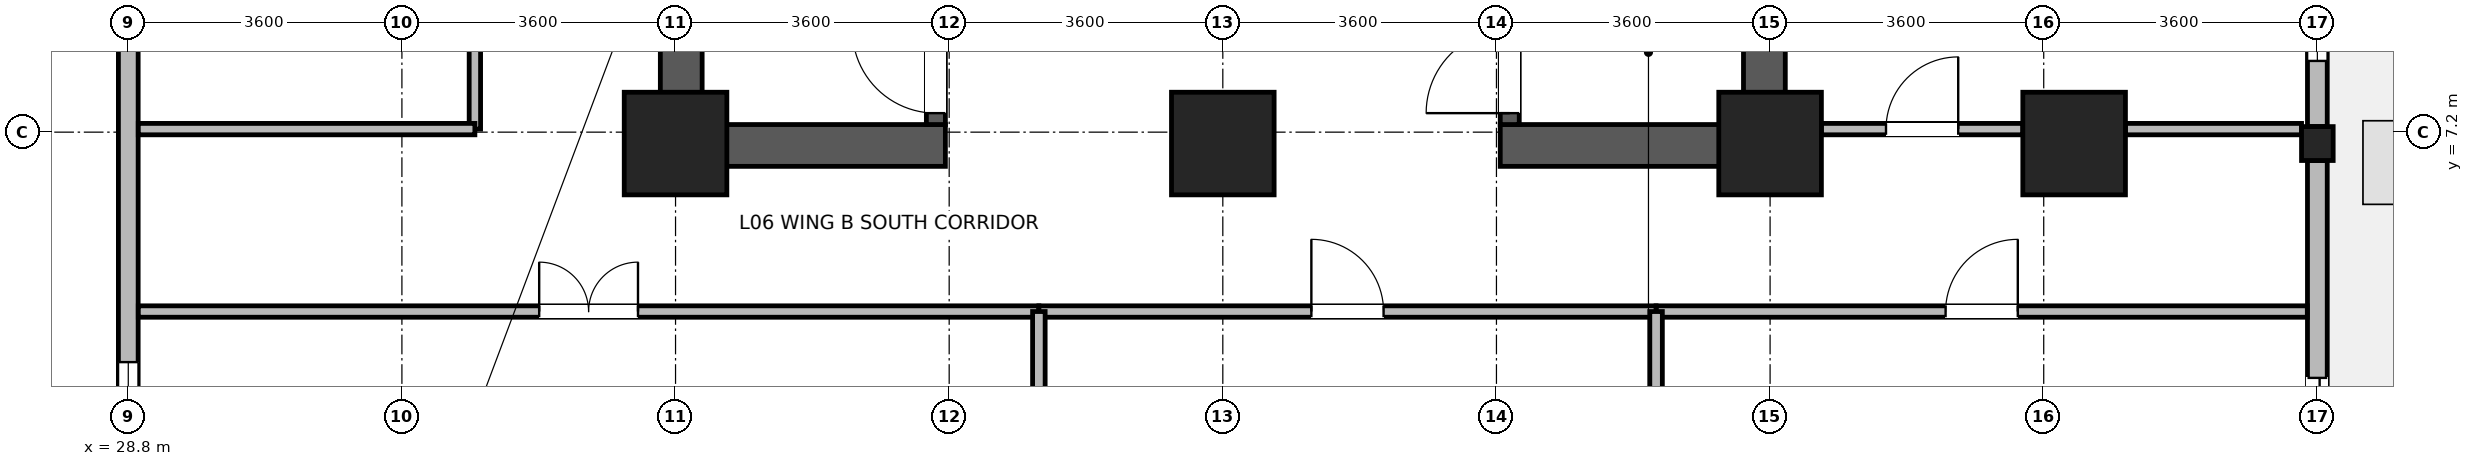
"""IFC4 building model, lengths in metres.
Left out: names, types, materials, properties, quantities, classifications, styles, units other than length and angle.
Written with IfcOpenShell. Run it as: python <this file> out.ifc"""

import sys

from ifc_helpers import new_model, si_unit, direction, frame, frame_2d, origin, origin_2d, place, context, subcontext, project, spatial, rectangle, i_section, extrude, source, transform, mapped, element, fill, save


model = new_model("IFC4")
c1 = context("Model", 3, precision=1e-05, world=origin(), true_north=direction((0.0, 1.0)))
c2 = subcontext(c1, "Body", "Model", "MODEL_VIEW")
j1 = project(units=[si_unit("LENGTHUNIT", "METRE"), si_unit("PLANEANGLEUNIT", "RADIAN")], contexts=[c1])
p1 = place(None, origin())
s1 = spatial("IfcSite", under=j1, at=p1, CompositionType="ELEMENT")
p2 = place(p1, origin())
s2 = spatial("IfcBuilding", under=s1, at=p2, CompositionType="ELEMENT")
p3 = place(p2, frame((0.0, 0.0, 29.0)))
s3 = spatial("IfcBuildingStorey", under=s2, at=p3, CompositionType="ELEMENT", Elevation=29.0)
for number, where, z_axis, x_axis in (
    (1, (36.075, 6.75, 0.0), (0.0, 0.0, 1.0), (0.0, 1.0, 0.0)),
    (2, (50.325, 6.75, 0.0), (0.0, 0.0, 1.0), (0.0, 1.0, 0.0)),
):
    element("IfcWall", number, at=place(p3, frame(where, z_axis=z_axis, x_axis=x_axis)), inside=s3, PredefinedType="SHEAR", context=c2, shape_type="SweptSolid", body=[
        extrude(rectangle(XDim=8.1, YDim=0.55, at=frame_2d((4.05, 0.0))), origin(), (0.0, 0.0, 1.0), 3.45),
    ])
for number, where, z_axis, x_axis in (
    (3, (36.35, 7.025, 0.0), (0.0, 0.0, 1.0), (1.0, 0.0, 0.0)),
    (4, (46.85, 7.025, 0.0), (0.0, 0.0, 1.0), (1.0, 0.0, 0.0)),
):
    element("IfcWall", number, at=place(p3, frame(where, z_axis=z_axis, x_axis=x_axis)), inside=s3, PredefinedType="SHEAR", context=c2, shape_type="SweptSolid", body=[
        extrude(rectangle(XDim=3.2, YDim=0.55, at=frame_2d((1.6, 0.0))), origin(), (0.0, 0.0, 1.0), 3.45),
    ])
p4 = place(p3, frame((39.425, 7.3, 0.0), z_axis=(0.0, 0.0, 1.0), x_axis=(0.0, 1.0, 0.0)))
e5 = element("IfcWall", 5, at=p4, inside=s3, PredefinedType="SHEAR", context=c2, shape_type="SweptSolid", body=[
    extrude(rectangle(XDim=7.0, YDim=0.25, at=frame_2d((3.5, 0.0))), origin(), (0.0, 0.0, 1.0), 3.45),
])
p5 = place(p4, frame((0.15, 0.0, 0.0)))
e6 = element("IfcOpeningElement", 6, at=p5, cuts=e5, PredefinedType="OPENING", context=c2, shape_type="SweptSolid", body=[
    extrude(rectangle(XDim=1.1, YDim=2.08, at=frame_2d((0.55, 1.04))), frame((0.0, 0.135, 0.0), z_axis=(0.0, -1.0, 0.0), x_axis=(1.0, 0.0, 0.0)), (0.0, 0.0, 1.0), 0.27),
])
p6 = place(p3, frame((46.975, 7.3, 0.0), z_axis=(0.0, 0.0, 1.0), x_axis=(0.0, 1.0, 0.0)))
e7 = element("IfcWall", 7, at=p6, inside=s3, PredefinedType="SHEAR", context=c2, shape_type="SweptSolid", body=[
    extrude(rectangle(XDim=7.0, YDim=0.25, at=frame_2d((3.5, 0.0))), origin(), (0.0, 0.0, 1.0), 3.45),
])
p7 = place(p6, frame((0.15, 0.0, 0.0)))
e8 = element("IfcOpeningElement", 8, at=p7, cuts=e7, PredefinedType="OPENING", context=c2, shape_type="SweptSolid", body=[
    extrude(rectangle(XDim=1.1, YDim=2.08, at=frame_2d((0.55, 1.04))), frame((0.0, 0.135, 0.0), z_axis=(0.0, -1.0, 0.0), x_axis=(1.0, 0.0, 0.0)), (0.0, 0.0, 1.0), 0.27),
])
m1 = source(origin(), c2, "Body", "SweptSolid", [
    extrude(rectangle(XDim=1.35, YDim=1.35, at=origin_2d()), origin(), (0.0, 0.0, 1.0), 3.7),
])
for number, where, z_axis, x_axis in (
    (9, (36.0, 7.05, 0.0), (0.0, 0.0, 1.0), (1.0, 0.0, 0.0)),
    (10, (43.2, 7.05, 0.0), (0.0, 0.0, 1.0), (1.0, 0.0, 0.0)),
    (11, (50.4, 7.05, 0.0), (0.0, 0.0, 1.0), (1.0, 0.0, 0.0)),
    (12, (54.4, 7.05, 0.0), (0.0, 0.0, 1.0), (1.0, 0.0, 0.0)),
):
    element("IfcColumn", number, at=place(p3, frame(where, z_axis=z_axis, x_axis=x_axis)), inside=s3, PredefinedType="COLUMN", context=c2, shape_type="MappedRepresentation", body=[
        mapped(m1, transform((0.0, 0.0, 0.0), x_axis=(1.0, 0.0, 0.0), y_axis=(0.0, 1.0, 0.0), z_axis=(0.0, 0.0, 1.0), scale=1.0)),
    ])
m2 = source(origin(), c2, "Body", "SweptSolid", [
    extrude(i_section(OverallWidth=0.416, OverallDepth=0.446, WebThickness=0.029, FlangeThickness=0.04, FilletRadius=0.015, at=origin_2d()), origin(), (0.0, 0.0, 1.0), 3.7),
])
p8 = place(p3, frame((57.6, 7.05, 0.0), z_axis=(0.0, 0.0, 1.0), x_axis=(1.0, 0.0, 0.0)))
e13 = element("IfcColumn", 13, at=p8, inside=s3, PredefinedType="COLUMN", context=c2, shape_type="MappedRepresentation", body=[
    mapped(m2, transform((0.0, 0.0, 0.0), x_axis=(1.0, 0.0, 0.0), y_axis=(0.0, 1.0, 0.0), z_axis=(0.0, 0.0, 1.0), scale=1.0)),
])
p9 = place(p3, frame((57.6, 6.826, 0.0), z_axis=(0.0, 0.0, 1.0), x_axis=(0.0, -1.0, 0.0)))
e14 = element("IfcWall", 14, at=p9, inside=s3, PredefinedType="STANDARD", context=c2, shape_type="SweptSolid", body=[
    extrude(rectangle(XDim=5.156, YDim=0.26, at=frame_2d((2.578, 0.0))), origin(), (0.0, 0.0, 1.0), 3.43),
])
p10 = place(p9, frame((2.859, 0.0, 0.0)))
e15 = element("IfcOpeningElement", 15, at=p10, cuts=e14, PredefinedType="OPENING", context=c2, shape_type="SweptSolid", body=[
    extrude(rectangle(XDim=1.5, YDim=2.15, at=frame_2d((0.75, 1.075))), frame((0.0, 0.14, 0.0), z_axis=(0.0, -1.0, 0.0), x_axis=(1.0, 0.0, 0.0)), (0.0, 0.0, 1.0), 0.28),
])
p11 = place(p3, frame((57.6, 14.326, 0.0), z_axis=(0.0, 0.0, 1.0), x_axis=(0.0, -1.0, 0.0)))
e16 = element("IfcWall", 16, at=p11, inside=s3, PredefinedType="STANDARD", context=c2, shape_type="SweptSolid", body=[
    extrude(rectangle(XDim=7.052, YDim=0.26, at=frame_2d((3.526, 0.0))), origin(), (0.0, 0.0, 1.0), 2.93),
])
p12 = place(p11, frame((0.863, 0.0, 0.85)))
e17 = element("IfcOpeningElement", 17, at=p12, cuts=e16, PredefinedType="OPENING", context=c2, shape_type="SweptSolid", body=[
    extrude(rectangle(XDim=1.8, YDim=1.85, at=frame_2d((0.9, 0.925))), frame((0.0, 0.14, 0.0), z_axis=(0.0, -1.0, 0.0), x_axis=(1.0, 0.0, 0.0)), (0.0, 0.0, 1.0), 0.28),
])
p13 = place(p11, frame((4.389, 0.0, 0.85)))
e18 = element("IfcOpeningElement", 18, at=p13, cuts=e16, PredefinedType="OPENING", context=c2, shape_type="SweptSolid", body=[
    extrude(rectangle(XDim=1.8, YDim=1.85, at=frame_2d((0.9, 0.925))), frame((0.0, 0.14, 0.0), z_axis=(0.0, -1.0, 0.0), x_axis=(1.0, 0.0, 0.0)), (0.0, 0.0, 1.0), 0.28),
])
p14 = place(p3, frame((28.8, 1.67, 0.0), z_axis=(0.0, 0.0, 1.0), x_axis=(0.0, 1.0, 0.0)))
e19 = element("IfcWall", 19, at=p14, inside=s3, PredefinedType="STANDARD", context=c2, shape_type="SweptSolid", body=[
    extrude(rectangle(XDim=19.254, YDim=0.26, at=frame_2d((9.627, 0.0))), origin(), (0.0, 0.0, 1.0), 3.43),
])
p15 = place(p14, frame((0.705, 0.0, 0.85)))
e20 = element("IfcOpeningElement", 20, at=p15, cuts=e19, PredefinedType="OPENING", context=c2, shape_type="SweptSolid", body=[
    extrude(rectangle(XDim=1.8, YDim=1.85, at=frame_2d((0.9, 0.925))), frame((0.0, 0.14, 0.0), z_axis=(0.0, -1.0, 0.0), x_axis=(1.0, 0.0, 0.0)), (0.0, 0.0, 1.0), 0.28),
])
p16 = place(p14, frame((7.123, 0.0, 0.85)))
e21 = element("IfcOpeningElement", 21, at=p16, cuts=e19, PredefinedType="OPENING", context=c2, shape_type="SweptSolid", body=[
    extrude(rectangle(XDim=1.8, YDim=1.85, at=frame_2d((0.9, 0.925))), frame((0.0, 0.14, 0.0), z_axis=(0.0, -1.0, 0.0), x_axis=(1.0, 0.0, 0.0)), (0.0, 0.0, 1.0), 0.28),
])
p17 = place(p14, frame((10.332, 0.0, 0.85)))
e22 = element("IfcOpeningElement", 22, at=p17, cuts=e19, PredefinedType="OPENING", context=c2, shape_type="SweptSolid", body=[
    extrude(rectangle(XDim=1.8, YDim=1.85, at=frame_2d((0.9, 0.925))), frame((0.0, 0.14, 0.0), z_axis=(0.0, -1.0, 0.0), x_axis=(1.0, 0.0, 0.0)), (0.0, 0.0, 1.0), 0.28),
])
p18 = place(p14, frame((13.541, 0.0, 0.85)))
e23 = element("IfcOpeningElement", 23, at=p18, cuts=e19, PredefinedType="OPENING", context=c2, shape_type="SweptSolid", body=[
    extrude(rectangle(XDim=1.8, YDim=1.85, at=frame_2d((0.9, 0.925))), frame((0.0, 0.14, 0.0), z_axis=(0.0, -1.0, 0.0), x_axis=(1.0, 0.0, 0.0)), (0.0, 0.0, 1.0), 0.28),
])
p19 = place(p14, frame((16.75, 0.0, 0.85)))
e24 = element("IfcOpeningElement", 24, at=p19, cuts=e19, PredefinedType="OPENING", context=c2, shape_type="SweptSolid", body=[
    extrude(rectangle(XDim=1.8, YDim=1.85, at=frame_2d((0.9, 0.925))), frame((0.0, 0.14, 0.0), z_axis=(0.0, -1.0, 0.0), x_axis=(1.0, 0.0, 0.0)), (0.0, 0.0, 1.0), 0.28),
])
p20 = place(p3, frame((28.932, 4.84, 0.0), z_axis=(0.0, 0.0, 1.0), x_axis=(1.0, 0.0, 0.0)))
e25 = element("IfcWall", 25, at=p20, inside=s3, PredefinedType="PARTITIONING", context=c2, shape_type="SweptSolid", body=[
    extrude(rectangle(XDim=11.848, YDim=0.15, at=frame_2d((5.924, 0.0))), origin(), (0.0, 0.0, 1.0), 3.43),
])
p21 = place(p20, frame((5.274, 0.0, 0.0)))
e26 = element("IfcOpeningElement", 26, at=p21, cuts=e25, PredefinedType="OPENING", context=c2, shape_type="SweptSolid", body=[
    extrude(rectangle(XDim=1.3, YDim=2.12, at=frame_2d((0.65, 1.06))), frame((0.0, 0.085, 0.0), z_axis=(0.0, -1.0, 0.0), x_axis=(1.0, 0.0, 0.0)), (0.0, 0.0, 1.0), 0.17),
])
p22 = place(p3, frame((48.9, 4.84, 0.0), z_axis=(0.0, 0.0, 1.0), x_axis=(1.0, 0.0, 0.0)))
e27 = element("IfcWall", 27, at=p22, inside=s3, PredefinedType="PARTITIONING", context=c2, shape_type="SweptSolid", body=[
    extrude(rectangle(XDim=8.568, YDim=0.15, at=frame_2d((4.284, 0.0))), origin(), (0.0, 0.0, 1.0), 3.43),
])
p23 = place(p22, frame((3.809, 0.0, 0.0)))
e28 = element("IfcOpeningElement", 28, at=p23, cuts=e27, PredefinedType="OPENING", context=c2, shape_type="SweptSolid", body=[
    extrude(rectangle(XDim=0.95, YDim=2.1, at=frame_2d((0.475, 1.05))), frame((0.0, 0.085, 0.0), z_axis=(0.0, -1.0, 0.0), x_axis=(1.0, 0.0, 0.0)), (0.0, 0.0, 1.0), 0.17),
])
p24 = place(p3, frame((40.78, 4.84, 0.0), z_axis=(0.0, 0.0, 1.0), x_axis=(1.0, 0.0, 0.0)))
e29 = element("IfcWall", 29, at=p24, inside=s3, PredefinedType="PARTITIONING", context=c2, shape_type="SweptSolid", body=[
    extrude(rectangle(XDim=8.12, YDim=0.15, at=frame_2d((4.06, 0.0))), origin(), (0.0, 0.0, 1.0), 3.43),
])
p25 = place(p24, frame((3.585, 0.0, 0.0)))
e30 = element("IfcOpeningElement", 30, at=p25, cuts=e29, PredefinedType="OPENING", context=c2, shape_type="SweptSolid", body=[
    extrude(rectangle(XDim=0.95, YDim=2.1, at=frame_2d((0.475, 1.05))), frame((0.0, 0.085, 0.0), z_axis=(0.0, -1.0, 0.0), x_axis=(1.0, 0.0, 0.0)), (0.0, 0.0, 1.0), 0.17),
])
p26 = place(p3, frame((33.36, 7.24, 0.0), z_axis=(0.0, 0.0, 1.0), x_axis=(0.0, 1.0, 0.0)))
e31 = element("IfcWall", 31, at=p26, inside=s3, PredefinedType="PARTITIONING", context=c2, shape_type="SweptSolid", body=[
    extrude(rectangle(XDim=7.26, YDim=0.15, at=frame_2d((3.63, 0.0))), origin(), (0.0, 0.0, 1.0), 3.43),
])
p27 = place(p26, frame((2.98, 0.0, 0.0)))
e32 = element("IfcOpeningElement", 32, at=p27, cuts=e31, PredefinedType="OPENING", context=c2, shape_type="SweptSolid", body=[
    extrude(rectangle(XDim=1.3, YDim=2.12, at=frame_2d((0.65, 1.06))), frame((0.0, 0.085, 0.0), z_axis=(0.0, -1.0, 0.0), x_axis=(1.0, 0.0, 0.0)), (0.0, 0.0, 1.0), 0.17),
])
p28 = place(p3, frame((51.075, 7.24, 0.0), z_axis=(0.0, 0.0, 1.0), x_axis=(1.0, 0.0, 0.0)))
e33 = element("IfcWall", 33, at=p28, inside=s3, PredefinedType="PARTITIONING", context=c2, shape_type="SweptSolid", body=[
    extrude(rectangle(XDim=2.65, YDim=0.15, at=frame_2d((1.325, 0.0))), origin(), (0.0, 0.0, 1.0), 2.78),
])
p29 = place(p28, frame((0.85, 0.0, 0.0)))
e34 = element("IfcOpeningElement", 34, at=p29, cuts=e33, PredefinedType="OPENING", context=c2, shape_type="SweptSolid", body=[
    extrude(rectangle(XDim=0.95, YDim=2.1, at=frame_2d((0.475, 1.05))), frame((0.0, 0.085, 0.0), z_axis=(0.0, -1.0, 0.0), x_axis=(1.0, 0.0, 0.0)), (0.0, 0.0, 1.0), 0.17),
])
p30 = place(p3, frame((55.075, 7.24, 0.0), z_axis=(0.0, 0.0, 1.0), x_axis=(1.0, 0.0, 0.0)))
e35 = element("IfcWall", 35, at=p30, inside=s3, PredefinedType="PARTITIONING", context=c2, shape_type="SweptSolid", body=[
    extrude(rectangle(XDim=2.317, YDim=0.15, at=frame_2d((1.159, 0.0))), origin(), (0.0, 0.0, 1.0), 2.78),
])
p31 = place(p3, frame((28.932, 7.24, 0.0), z_axis=(0.0, 0.0, 1.0), x_axis=(1.0, 0.0, 0.0)))
e36 = element("IfcWall", 36, at=p31, inside=s3, PredefinedType="PARTITIONING", context=c2, shape_type="SweptSolid", body=[
    extrude(rectangle(XDim=4.428, YDim=0.15, at=frame_2d((2.214, 0.0))), origin(), (0.0, 0.0, 1.0), 3.43),
])
for number, where, z_axis, x_axis in (
    (37, (40.78, 1.932, 0.0), (0.0, 0.0, 1.0), (0.0, 1.0, 0.0)),
    (38, (48.9, 1.932, 0.0), (0.0, 0.0, 1.0), (0.0, 1.0, 0.0)),
):
    element("IfcWall", number, at=place(p3, frame(where, z_axis=z_axis, x_axis=x_axis)), inside=s3, PredefinedType="PARTITIONING", context=c2, shape_type="SweptSolid", body=[
        extrude(rectangle(XDim=2.908, YDim=0.165, at=frame_2d((1.454, 0.0))), origin(), (0.0, 0.0, 1.0), 3.43),
    ])
p32 = place(p10, origin())
e39 = element("IfcDoor", 39, at=p32, inside=s3, OperationType="SLIDING_TO_LEFT", PredefinedType="DOOR", context=c2, shape_type="SweptSolid", body=[
    extrude(rectangle(XDim=1.5, YDim=2.15, at=frame_2d((0.75, 1.075))), frame((0.0, 0.025, 0.0), z_axis=(0.0, -1.0, 0.0), x_axis=(1.0, 0.0, 0.0)), (0.0, 0.0, 1.0), 0.05),
])
fill(e15, e39)
p33 = place(p13, origin())
e40 = element("IfcWindow", 40, at=p33, inside=s3, PartitioningType="SINGLE_PANEL", PredefinedType="WINDOW", context=c2, shape_type="SweptSolid", body=[
    extrude(rectangle(XDim=1.8, YDim=1.85, at=frame_2d((0.9, 0.925))), frame((0.0, 0.03, 0.0), z_axis=(0.0, -1.0, 0.0), x_axis=(1.0, 0.0, 0.0)), (0.0, 0.0, 1.0), 0.06),
])
fill(e18, e40)
p34 = place(p15, origin())
e41 = element("IfcWindow", 41, at=p34, inside=s3, PartitioningType="SINGLE_PANEL", PredefinedType="WINDOW", context=c2, shape_type="SweptSolid", body=[
    extrude(rectangle(XDim=1.8, YDim=1.85, at=frame_2d((0.9, 0.925))), frame((0.0, 0.03, 0.0), z_axis=(0.0, -1.0, 0.0), x_axis=(1.0, 0.0, 0.0)), (0.0, 0.0, 1.0), 0.06),
])
fill(e20, e41)
p35 = place(p5, origin())
e42 = element("IfcDoor", 42, at=p35, inside=s3, OperationType="SINGLE_SWING_RIGHT", PredefinedType="DOOR", context=c2, shape_type="SweptSolid", body=[
    extrude(rectangle(XDim=1.1, YDim=2.08, at=frame_2d((0.55, 1.04))), frame((0.0, 0.025, 0.0), z_axis=(0.0, -1.0, 0.0), x_axis=(1.0, 0.0, 0.0)), (0.0, 0.0, 1.0), 0.05),
])
fill(e6, e42)
p36 = place(p7, origin())
e43 = element("IfcDoor", 43, at=p36, inside=s3, OperationType="SINGLE_SWING_LEFT", PredefinedType="DOOR", context=c2, shape_type="SweptSolid", body=[
    extrude(rectangle(XDim=1.1, YDim=2.08, at=frame_2d((0.55, 1.04))), frame((0.0, 0.025, 0.0), z_axis=(0.0, -1.0, 0.0), x_axis=(1.0, 0.0, 0.0)), (0.0, 0.0, 1.0), 0.05),
])
fill(e8, e43)
p37 = place(p21, origin())
e44 = element("IfcDoor", 44, at=p37, inside=s3, OperationType="DOUBLE_DOOR_SINGLE_SWING", PredefinedType="DOOR", context=c2, shape_type="SweptSolid", body=[
    extrude(rectangle(XDim=1.3, YDim=2.12, at=frame_2d((0.65, 1.06))), frame((0.0, 0.025, 0.0), z_axis=(0.0, -1.0, 0.0), x_axis=(1.0, 0.0, 0.0)), (0.0, 0.0, 1.0), 0.05),
])
fill(e26, e44)
p38 = place(p23, origin())
e45 = element("IfcDoor", 45, at=p38, inside=s3, OperationType="SINGLE_SWING_RIGHT", PredefinedType="DOOR", context=c2, shape_type="SweptSolid", body=[
    extrude(rectangle(XDim=0.95, YDim=2.1, at=frame_2d((0.475, 1.05))), frame((0.0, 0.025, 0.0), z_axis=(0.0, -1.0, 0.0), x_axis=(1.0, 0.0, 0.0)), (0.0, 0.0, 1.0), 0.05),
])
fill(e28, e45)
p39 = place(p25, origin())
e46 = element("IfcDoor", 46, at=p39, inside=s3, OperationType="SINGLE_SWING_LEFT", PredefinedType="DOOR", context=c2, shape_type="SweptSolid", body=[
    extrude(rectangle(XDim=0.95, YDim=2.1, at=frame_2d((0.475, 1.05))), frame((0.0, 0.025, 0.0), z_axis=(0.0, -1.0, 0.0), x_axis=(1.0, 0.0, 0.0)), (0.0, 0.0, 1.0), 0.05),
])
fill(e30, e46)
p40 = place(p29, origin())
e47 = element("IfcDoor", 47, at=p40, inside=s3, OperationType="SINGLE_SWING_RIGHT", PredefinedType="DOOR", context=c2, shape_type="SweptSolid", body=[
    extrude(rectangle(XDim=0.95, YDim=2.1, at=frame_2d((0.475, 1.05))), frame((0.0, 0.025, 0.0), z_axis=(0.0, -1.0, 0.0), x_axis=(1.0, 0.0, 0.0)), (0.0, 0.0, 1.0), 0.05),
])
fill(e34, e47)
save(model, sys.argv[1])
